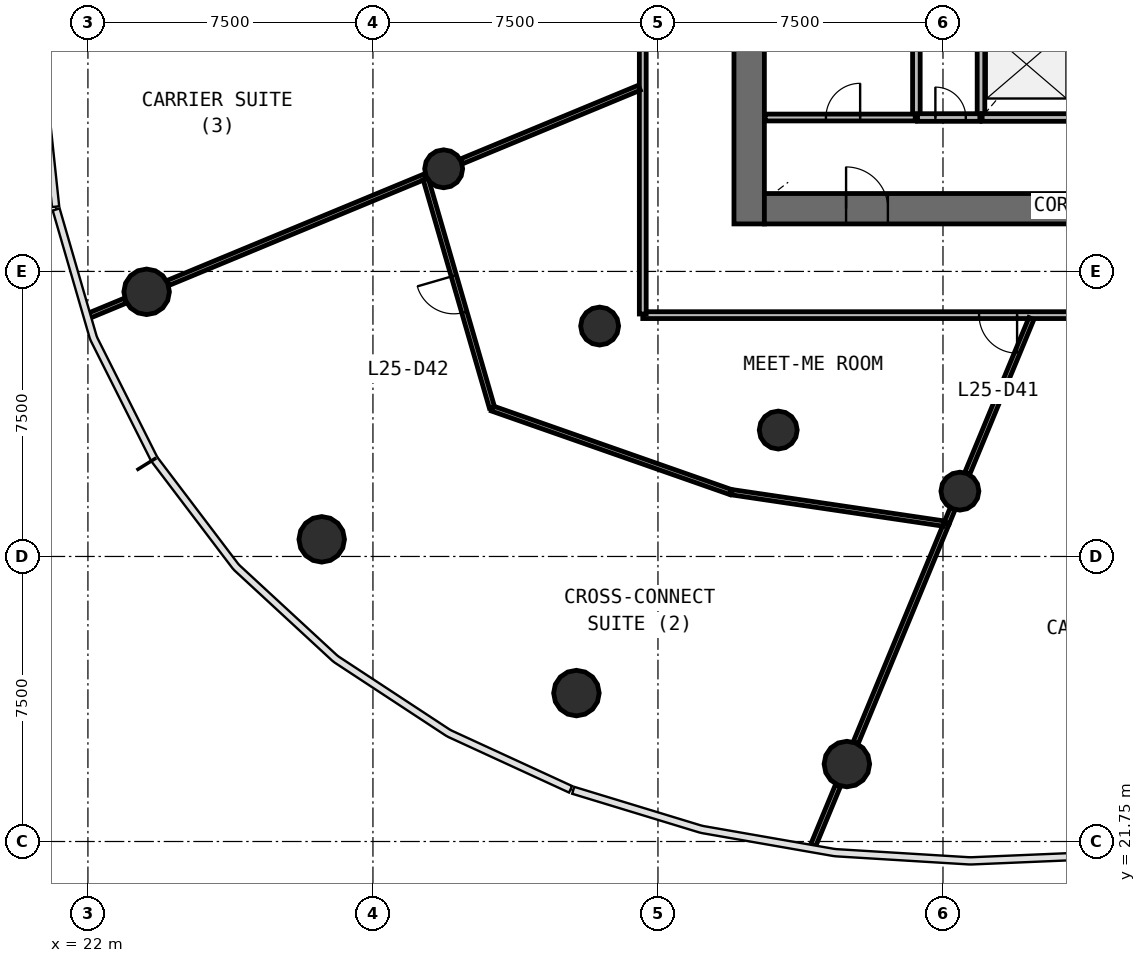
"""IFC4 building model, lengths in metres.
Left out: names, types, materials, properties, quantities, classifications, styles, units other than length and angle.
Written with IfcOpenShell. Run it as: python <this file> out.ifc"""

import sys

from ifc_helpers import new_model, si_unit, direction, frame, frame_2d, origin, origin_2d, place, context, subcontext, project, spatial, rectangle, circle, extrude, source, transform, mapped, element, fill, save


model = new_model("IFC4")
c1 = context("Model", 3, precision=1e-05, world=origin(), true_north=direction((0.0, 1.0)))
c2 = subcontext(c1, "Body", "Model", "MODEL_VIEW")
j1 = project(units=[si_unit("LENGTHUNIT", "METRE"), si_unit("PLANEANGLEUNIT", "RADIAN")], contexts=[c1])
p1 = place(None, origin())
s1 = spatial("IfcSite", under=j1, at=p1, CompositionType="ELEMENT")
p2 = place(p1, origin())
s2 = spatial("IfcBuilding", under=s1, at=p2, CompositionType="ELEMENT")
p3 = place(p2, frame((0.0, 0.0, 108.5)))
s3 = spatial("IfcBuildingStorey", under=s2, at=p3, CompositionType="ELEMENT", Elevation=108.5)
p4 = place(p3, frame((39.4, 58.0, 0.0), z_axis=(0.0, 0.0, 1.0), x_axis=(0.0, -1.0, 0.0)))
e1 = element("IfcWall", 1, at=p4, inside=s3, PredefinedType="SHEAR", context=c2, shape_type="SweptSolid", body=[
    extrude(rectangle(XDim=20.0, YDim=0.8, at=frame_2d((10.0, 0.0))), origin(), (0.0, 0.0, 1.0), 4.1),
])
p5 = place(p4, frame((9.1, 0.0, 0.0)))
e2 = element("IfcOpeningElement", 2, at=p5, cuts=e1, PredefinedType="OPENING", context=c2, shape_type="SweptSolid", body=[
    extrude(rectangle(XDim=1.8, YDim=2.1, at=frame_2d((0.9, 1.05))), frame((0.0, 0.41, 0.0), z_axis=(0.0, -1.0, 0.0), x_axis=(1.0, 0.0, 0.0)), (0.0, 0.0, 1.0), 0.82),
])
p6 = place(p3, frame((39.8, 38.4, 0.0), z_axis=(0.0, 0.0, 1.0), x_axis=(1.0, 0.0, 0.0)))
e3 = element("IfcWall", 3, at=p6, inside=s3, PredefinedType="SHEAR", context=c2, shape_type="SweptSolid", body=[
    extrude(rectangle(XDim=24.4, YDim=0.8, at=frame_2d((12.2, 0.0))), origin(), (0.0, 0.0, 1.0), 4.1),
])
p7 = place(p6, frame((21.65, 0.0, 0.0)))
e4 = element("IfcOpeningElement", 4, at=p7, cuts=e3, PredefinedType="OPENING", context=c2, shape_type="SweptSolid", body=[
    extrude(rectangle(XDim=1.1, YDim=2.1, at=frame_2d((0.55, 1.05))), frame((0.0, 0.41, 0.0), z_axis=(0.0, -1.0, 0.0), x_axis=(1.0, 0.0, 0.0)), (0.0, 0.0, 1.0), 0.82),
])
p8 = place(p6, frame((2.15, 0.0, 0.0)))
e5 = element("IfcOpeningElement", 5, at=p8, cuts=e3, PredefinedType="OPENING", context=c2, shape_type="SweptSolid", body=[
    extrude(rectangle(XDim=1.1, YDim=2.1, at=frame_2d((0.55, 1.05))), frame((0.0, 0.41, 0.0), z_axis=(0.0, -1.0, 0.0), x_axis=(1.0, 0.0, 0.0)), (0.0, 0.0, 1.0), 0.82),
])
m1 = source(origin(), c2, "Body", "SweptSolid", [
    extrude(circle(Radius=0.6, at=origin_2d()), origin(), (0.0, 0.0, 1.0), 4.1),
])
for number, where, z_axis, x_axis in (
    (6, (23.544, 36.213, 0.0), (0.0, 0.0, 1.0), (1.0, 0.0, 0.0)),
    (7, (28.152, 29.701, 0.0), (0.0, 0.0, 1.0), (1.0, 0.0, 0.0)),
    (8, (34.854, 25.655, 0.0), (0.0, 0.0, 1.0), (1.0, 0.0, 0.0)),
    (9, (41.971, 23.788, 0.0), (0.0, 0.0, 1.0), (1.0, 0.0, 0.0)),
):
    element("IfcColumn", number, at=place(p3, frame(where, z_axis=z_axis, x_axis=x_axis)), inside=s3, PredefinedType="COLUMN", context=c2, shape_type="MappedRepresentation", body=[
        mapped(m1, transform((0.0, 0.0, 0.0), scale=1.0)),
    ])
m2 = source(origin(), c2, "Body", "SweptSolid", [
    extrude(circle(Radius=0.5, at=origin_2d()), origin(), (0.0, 0.0, 1.0), 4.1),
])
for number, where, z_axis, x_axis in (
    (10, (31.361, 39.451, 0.0), (0.0, 0.0, 1.0), (1.0, 0.0, 0.0)),
    (11, (35.465, 35.312, 0.0), (0.0, 0.0, 1.0), (1.0, 0.0, 0.0)),
    (12, (40.165, 32.576, 0.0), (0.0, 0.0, 1.0), (1.0, 0.0, 0.0)),
    (13, (44.945, 30.969, 0.0), (0.0, 0.0, 1.0), (1.0, 0.0, 0.0)),
):
    element("IfcColumn", number, at=place(p3, frame(where, z_axis=z_axis, x_axis=x_axis)), inside=s3, PredefinedType="COLUMN", context=c2, shape_type="MappedRepresentation", body=[
        mapped(m2, transform((0.0, 0.0, 0.0), scale=1.0)),
    ])
for number, where, z_axis, x_axis in (
    (14, (43.8, 43.6, 0.0), (0.0, 0.0, 1.0), (0.0, -1.0, 0.0)),
    (15, (45.5, 43.6, 0.0), (0.0, 0.0, 1.0), (0.0, -1.0, 0.0)),
):
    element("IfcWall", number, at=place(p3, frame(where, z_axis=z_axis, x_axis=x_axis)), inside=s3, PredefinedType="SOLIDWALL", context=c2, shape_type="SweptSolid", body=[
        extrude(rectangle(XDim=2.8, YDim=0.2, at=frame_2d((1.4, 0.0))), origin(), (0.0, 0.0, 1.0), 3.7),
    ])
p9 = place(p3, frame((45.53, 40.8, 0.0), z_axis=(0.0, 0.0, 1.0), x_axis=(1.0, 0.0, 0.0)))
e16 = element("IfcWall", 16, at=p9, inside=s3, PredefinedType="SOLIDWALL", context=c2, shape_type="SweptSolid", body=[
    extrude(rectangle(XDim=2.34, YDim=0.2, at=frame_2d((1.17, 0.0))), origin(), (0.0, 0.0, 1.0), 3.7),
])
p10 = place(p3, frame((43.83, 40.8, 0.0), z_axis=(0.0, 0.0, 1.0), x_axis=(1.0, 0.0, 0.0)))
e17 = element("IfcWall", 17, at=p10, inside=s3, PredefinedType="SOLIDWALL", context=c2, shape_type="SweptSolid", body=[
    extrude(rectangle(XDim=1.64, YDim=0.2, at=frame_2d((0.82, 0.0))), origin(), (0.0, 0.0, 1.0), 3.7),
])
p11 = place(p10, frame((0.47, 0.0, 0.0)))
e18 = element("IfcOpeningElement", 18, at=p11, cuts=e17, PredefinedType="OPENING", context=c2, shape_type="SweptSolid", body=[
    extrude(rectangle(XDim=0.8, YDim=2.1, at=frame_2d((0.4, 1.05))), frame((0.0, 0.11, 0.0), z_axis=(0.0, -1.0, 0.0), x_axis=(1.0, 0.0, 0.0)), (0.0, 0.0, 1.0), 0.22),
])
p12 = place(p3, frame((67.4, 35.6, 0.0), z_axis=(0.0, 0.0, 1.0), x_axis=(-1.0, 0.0, 0.0)))
e19 = element("IfcWall", 19, at=p12, inside=s3, PredefinedType="PARTITIONING", context=c2, shape_type="SweptSolid", body=[
    extrude(rectangle(XDim=30.8, YDim=0.18, at=frame_2d((15.4, 0.0))), origin(), (0.0, 0.0, 1.0), 2.9),
])
p13 = place(p12, frame((9.05, 0.0, 0.0)))
e20 = element("IfcOpeningElement", 20, at=p13, cuts=e19, PredefinedType="OPENING", context=c2, shape_type="SweptSolid", body=[
    extrude(rectangle(XDim=0.9, YDim=2.1, at=frame_2d((0.45, 1.05))), frame((0.0, 0.1, 0.0), z_axis=(0.0, -1.0, 0.0), x_axis=(1.0, 0.0, 0.0)), (0.0, 0.0, 1.0), 0.2),
])
p14 = place(p12, frame((6.05, 0.0, 0.0)))
e21 = element("IfcOpeningElement", 21, at=p14, cuts=e19, PredefinedType="OPENING", context=c2, shape_type="SweptSolid", body=[
    extrude(rectangle(XDim=0.9, YDim=2.1, at=frame_2d((0.45, 1.05))), frame((0.0, 0.1, 0.0), z_axis=(0.0, -1.0, 0.0), x_axis=(1.0, 0.0, 0.0)), (0.0, 0.0, 1.0), 0.2),
])
p15 = place(p12, frame((2.45, 0.0, 0.0)))
e22 = element("IfcOpeningElement", 22, at=p15, cuts=e19, PredefinedType="OPENING", context=c2, shape_type="SweptSolid", body=[
    extrude(rectangle(XDim=0.9, YDim=2.1, at=frame_2d((0.45, 1.05))), frame((0.0, 0.1, 0.0), z_axis=(0.0, -1.0, 0.0), x_axis=(1.0, 0.0, 0.0)), (0.0, 0.0, 1.0), 0.2),
])
p16 = place(p12, frame((20.95, 0.0, 0.0)))
e23 = element("IfcOpeningElement", 23, at=p16, cuts=e19, PredefinedType="OPENING", context=c2, shape_type="SweptSolid", body=[
    extrude(rectangle(XDim=1.0, YDim=2.1, at=frame_2d((0.5, 1.05))), frame((0.0, 0.1, 0.0), z_axis=(0.0, -1.0, 0.0), x_axis=(1.0, 0.0, 0.0)), (0.0, 0.0, 1.0), 0.2),
])
p17 = place(p12, frame((14.95, 0.0, 0.0)))
e24 = element("IfcOpeningElement", 24, at=p17, cuts=e19, PredefinedType="OPENING", context=c2, shape_type="SweptSolid", body=[
    extrude(rectangle(XDim=1.0, YDim=2.1, at=frame_2d((0.5, 1.05))), frame((0.0, 0.1, 0.0), z_axis=(0.0, -1.0, 0.0), x_axis=(1.0, 0.0, 0.0)), (0.0, 0.0, 1.0), 0.2),
])
p18 = place(p12, frame((12.55, 0.0, 0.0)))
e25 = element("IfcOpeningElement", 25, at=p18, cuts=e19, PredefinedType="OPENING", context=c2, shape_type="SweptSolid", body=[
    extrude(rectangle(XDim=1.0, YDim=2.1, at=frame_2d((0.5, 1.05))), frame((0.0, 0.1, 0.0), z_axis=(0.0, -1.0, 0.0), x_axis=(1.0, 0.0, 0.0)), (0.0, 0.0, 1.0), 0.2),
])
p19 = place(p3, frame((36.6, 35.63, 0.0), z_axis=(0.0, 0.0, 1.0), x_axis=(0.0, 1.0, 0.0)))
e26 = element("IfcWall", 26, at=p19, inside=s3, PredefinedType="PARTITIONING", context=c2, shape_type="SweptSolid", body=[
    extrude(rectangle(XDim=23.583, YDim=0.18, at=frame_2d((11.791, 0.0))), origin(), (0.0, 0.0, 1.0), 2.9),
])
p20 = place(p19, frame((11.333, 0.0, 0.0)))
e27 = element("IfcOpeningElement", 27, at=p20, cuts=e26, PredefinedType="OPENING", context=c2, shape_type="SweptSolid", body=[
    extrude(rectangle(XDim=1.0, YDim=2.1, at=frame_2d((0.5, 1.05))), frame((0.0, 0.1, 0.0), z_axis=(0.0, -1.0, 0.0), x_axis=(1.0, 0.0, 0.0)), (0.0, 0.0, 1.0), 0.2),
])
p21 = place(p19, frame((9.133, 0.0, 0.0)))
e28 = element("IfcOpeningElement", 28, at=p21, cuts=e26, PredefinedType="OPENING", context=c2, shape_type="SweptSolid", body=[
    extrude(rectangle(XDim=1.0, YDim=2.1, at=frame_2d((0.5, 1.05))), frame((0.0, 0.1, 0.0), z_axis=(0.0, -1.0, 0.0), x_axis=(1.0, 0.0, 0.0)), (0.0, 0.0, 1.0), 0.2),
])
p22 = place(p3, frame((39.82, 40.8, 0.0), z_axis=(0.0, 0.0, 1.0), x_axis=(1.0, 0.0, 0.0)))
e29 = element("IfcWall", 29, at=p22, inside=s3, PredefinedType="PARTITIONING", context=c2, shape_type="SweptSolid", body=[
    extrude(rectangle(XDim=3.95, YDim=0.18, at=frame_2d((1.975, 0.0))), origin(), (0.0, 0.0, 1.0), 3.7),
])
p23 = place(p22, frame((1.6, 0.0, 0.0)))
e30 = element("IfcOpeningElement", 30, at=p23, cuts=e29, PredefinedType="OPENING", context=c2, shape_type="SweptSolid", body=[
    extrude(rectangle(XDim=0.9, YDim=2.1, at=frame_2d((0.45, 1.05))), frame((0.0, 0.1, 0.0), z_axis=(0.0, -1.0, 0.0), x_axis=(1.0, 0.0, 0.0)), (0.0, 0.0, 1.0), 0.2),
])
p24 = place(p3, frame((30.87, 39.248, 0.0), z_axis=(0.0, 0.0, 1.0), x_axis=(-0.923871790576, -0.382702122514, 0.0)))
e31 = element("IfcWall", 31, at=p24, inside=s3, PredefinedType="PARTITIONING", context=c2, shape_type="SweptSolid", body=[
    extrude(rectangle(XDim=7.324, YDim=0.14, at=frame_2d((3.662, 0.0))), origin(), (0.0, 0.0, 1.0), 2.9),
])
p25 = place(p3, frame((32.639, 33.144, 0.0), z_axis=(0.0, 0.0, 1.0), x_axis=(0.943712844309, -0.330765880173, 0.0)))
e32 = element("IfcWall", 32, at=p25, inside=s3, PredefinedType="PARTITIONING", context=c2, shape_type="SweptSolid", body=[
    extrude(rectangle(XDim=6.648, YDim=0.14, at=frame_2d((3.324, 0.0))), origin(), (0.0, 0.0, 1.0), 2.9),
])
p26 = place(p3, frame((32.631, 33.173, 0.0), z_axis=(0.0, 0.0, 1.0), x_axis=(-0.278343340878, 0.960481641984, 0.0)))
e33 = element("IfcWall", 33, at=p26, inside=s3, PredefinedType="PARTITIONING", context=c2, shape_type="SweptSolid", body=[
    extrude(rectangle(XDim=6.255, YDim=0.14, at=frame_2d((3.127, 0.0))), origin(), (0.0, 0.0, 1.0), 2.9),
])
p27 = place(p26, frame((2.604, 0.0, 0.0)))
e34 = element("IfcOpeningElement", 34, at=p27, cuts=e33, PredefinedType="OPENING", context=c2, shape_type="SweptSolid", body=[
    extrude(rectangle(XDim=1.0, YDim=2.1, at=frame_2d((0.5, 1.05))), frame((0.0, 0.08, 0.0), z_axis=(0.0, -1.0, 0.0), x_axis=(1.0, 0.0, 0.0)), (0.0, 0.0, 1.0), 0.16),
])
p28 = place(p3, frame((44.588, 30.106, 0.0), z_axis=(0.0, 0.0, 1.0), x_axis=(-0.382687319502, -0.923877922397, 0.0)))
e35 = element("IfcWall", 35, at=p28, inside=s3, PredefinedType="PARTITIONING", context=c2, shape_type="SweptSolid", body=[
    extrude(rectangle(XDim=6.234, YDim=0.14, at=frame_2d((3.117, 0.0))), origin(), (0.0, 0.0, 1.0), 2.9),
])
p29 = place(p3, frame((38.943, 30.94, 0.0), z_axis=(0.0, 0.0, 1.0), x_axis=(0.98924251215, -0.146284832283, 0.0)))
e36 = element("IfcWall", 36, at=p29, inside=s3, PredefinedType="PARTITIONING", context=c2, shape_type="SweptSolid", body=[
    extrude(rectangle(XDim=5.634, YDim=0.14, at=frame_2d((2.817, 0.0))), origin(), (0.0, 0.0, 1.0), 2.9),
])
p30 = place(p3, frame((36.51, 41.584, 0.0), z_axis=(0.0, 0.0, 1.0), x_axis=(-0.923890025086, -0.382658100067, 0.0)))
e37 = element("IfcWall", 37, at=p30, inside=s3, PredefinedType="PARTITIONING", context=c2, shape_type="SweptSolid", body=[
    extrude(rectangle(XDim=5.068, YDim=0.14, at=frame_2d((2.534, 0.0))), origin(), (0.0, 0.0, 1.0), 2.9),
])
p31 = place(p3, frame((46.826, 35.51, 0.0), z_axis=(0.0, 0.0, 1.0), x_axis=(-0.382672831764, -0.923883923353, 0.0)))
e38 = element("IfcWall", 38, at=p31, inside=s3, PredefinedType="PARTITIONING", context=c2, shape_type="SweptSolid", body=[
    extrude(rectangle(XDim=4.41, YDim=0.14, at=frame_2d((2.205, 0.0))), origin(), (0.0, 0.0, 1.0), 2.9),
])
p32 = place(p3, frame((41.74, 23.229, 0.0), z_axis=(0.0, 0.0, 1.0), x_axis=(-0.382769756697, -0.923843771077, 0.0)))
e39 = element("IfcWall", 39, at=p32, inside=s3, PredefinedType="PARTITIONING", context=c2, shape_type="SweptSolid", body=[
    extrude(rectangle(XDim=1.719, YDim=0.14, at=frame_2d((0.86, 0.0))), origin(), (0.0, 0.0, 1.0), 2.9),
])
p33 = place(p3, frame((22.986, 35.982, 0.0), z_axis=(0.0, 0.0, 1.0), x_axis=(-0.923909071339, -0.38261211154, 0.0)))
e40 = element("IfcWall", 40, at=p33, inside=s3, PredefinedType="PARTITIONING", context=c2, shape_type="SweptSolid", body=[
    extrude(rectangle(XDim=1.021, YDim=0.14, at=frame_2d((0.511, 0.0))), origin(), (0.0, 0.0, 1.0), 2.9),
])
p34 = place(p3, frame((44.752, 30.502, 0.0), z_axis=(0.0, 0.0, 1.0), x_axis=(-0.382441868588, -0.923979554509, 0.0)))
e41 = element("IfcWall", 41, at=p34, inside=s3, PredefinedType="PARTITIONING", context=c2, shape_type="SweptSolid", body=[
    extrude(rectangle(XDim=0.399, YDim=0.14, at=frame_2d((0.199, 0.0))), origin(), (0.0, 0.0, 1.0), 2.9),
])
m3 = source(origin(), c2, "Body", "SweptSolid", [
    extrude(rectangle(XDim=0.8, YDim=2.1, at=frame_2d((0.4, 1.05))), frame((0.0, 0.025, 0.0), z_axis=(0.0, -1.0, 0.0), x_axis=(1.0, 0.0, 0.0)), (0.0, 0.0, 1.0), 0.05),
])
p35 = place(p11, origin())
e42 = element("IfcDoor", 42, at=p35, inside=s3, OperationType="SINGLE_SWING_LEFT", PredefinedType="DOOR", context=c2, shape_type="MappedRepresentation", body=[
    mapped(m3, transform((0.0, 0.0, 0.0), scale=1.0)),
])
fill(e18, e42)
m4 = source(origin(), c2, "Body", "SweptSolid", [
    extrude(rectangle(XDim=1.1, YDim=2.1, at=frame_2d((0.55, 1.05))), frame((0.0, 0.025, 0.0), z_axis=(0.0, -1.0, 0.0), x_axis=(1.0, 0.0, 0.0)), (0.0, 0.0, 1.0), 0.05),
])
p36 = place(p8, origin())
e43 = element("IfcDoor", 43, at=p36, inside=s3, OperationType="SINGLE_SWING_LEFT", PredefinedType="DOOR", context=c2, shape_type="MappedRepresentation", body=[
    mapped(m4, transform((0.0, 0.0, 0.0), scale=1.0)),
])
fill(e5, e43)
m5 = source(origin(), c2, "Body", "SweptSolid", [
    extrude(rectangle(XDim=1.0, YDim=2.1, at=frame_2d((0.5, 1.05))), frame((0.0, 0.025, 0.0), z_axis=(0.0, -1.0, 0.0), x_axis=(1.0, 0.0, 0.0)), (0.0, 0.0, 1.0), 0.05),
])
p37 = place(p16, origin())
e44 = element("IfcDoor", 44, at=p37, inside=s3, OperationType="SINGLE_SWING_LEFT", PredefinedType="DOOR", context=c2, shape_type="MappedRepresentation", body=[
    mapped(m5, transform((0.0, 0.0, 0.0), scale=1.0)),
])
fill(e23, e44)
p38 = place(p27, origin())
e45 = element("IfcDoor", 45, at=p38, inside=s3, OperationType="SINGLE_SWING_RIGHT", PredefinedType="DOOR", context=c2, shape_type="MappedRepresentation", body=[
    mapped(m5, transform((0.0, 0.0, 0.0), scale=1.0)),
])
fill(e34, e45)
m6 = source(origin(), c2, "Body", "SweptSolid", [
    extrude(rectangle(XDim=0.9, YDim=2.1, at=frame_2d((0.45, 1.05))), frame((0.0, 0.025, 0.0), z_axis=(0.0, -1.0, 0.0), x_axis=(1.0, 0.0, 0.0)), (0.0, 0.0, 1.0), 0.05),
])
p39 = place(p23, origin())
e46 = element("IfcDoor", 46, at=p39, inside=s3, OperationType="SINGLE_SWING_RIGHT", PredefinedType="DOOR", context=c2, shape_type="MappedRepresentation", body=[
    mapped(m6, transform((0.0, 0.0, 0.0), scale=1.0)),
])
fill(e30, e46)
save(model, sys.argv[1])
